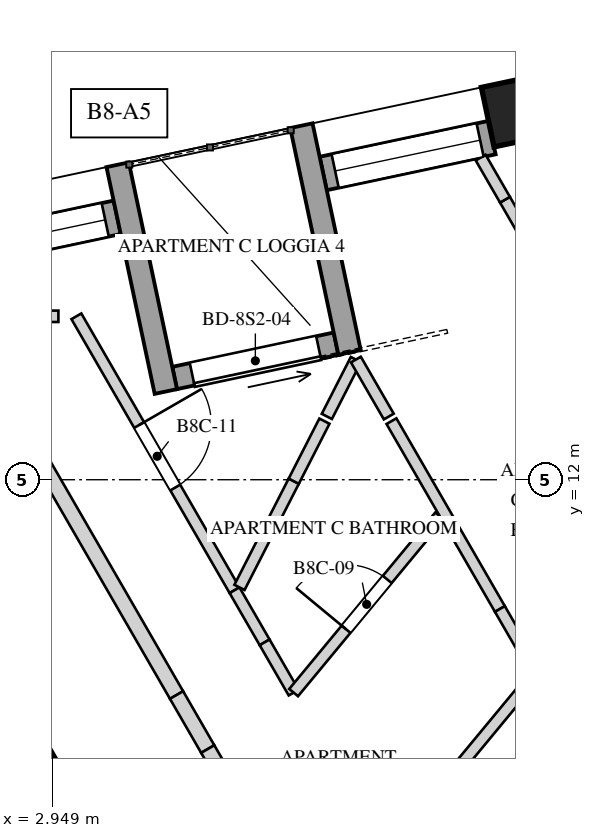
"""IFC4 building model, lengths in metres.
Left out: names, types, materials, properties, quantities, classifications, styles, units other than length and angle.
Written with IfcOpenShell. Run it as: python <this file> out.ifc"""

import sys

from ifc_helpers import new_model, si_unit, direction, frame, frame_2d, origin, origin_2d, place, context, subcontext, project, spatial, rectangle, extrude, element, fill, save


model = new_model("IFC4")
c1 = context("Model", 3, precision=1e-05, world=origin(), true_north=direction((0.0, 1.0)))
c2 = subcontext(c1, "Body", "Model", "MODEL_VIEW")
j1 = project(units=[si_unit("LENGTHUNIT", "METRE"), si_unit("PLANEANGLEUNIT", "RADIAN")], contexts=[c1])
p1 = place(None, origin())
s1 = spatial("IfcSite", under=j1, at=p1, CompositionType="ELEMENT")
p2 = place(p1, origin())
s2 = spatial("IfcBuilding", under=s1, at=p2, CompositionType="ELEMENT")
p3 = place(p2, frame((0.0, 0.0, 344.4)))
s3 = spatial("IfcBuildingStorey", under=s2, at=p3, CompositionType="ELEMENT", Elevation=344.4)
p4 = place(p3, frame((9.93, -4.25, 0.0), z_axis=(0.0, 0.0, 1.0), x_axis=(-0.499994590896, 0.86602852671, 0.0)))
e1 = element("IfcWall", 1, at=p4, inside=s3, PredefinedType="SHEAR", context=c2, shape_type="SweptSolid", body=[
    extrude(rectangle(XDim=17.292, YDim=0.55, at=frame_2d((8.646, 0.0))), origin(), (0.0, 0.0, 1.0), 4.0),
])
p5 = place(p4, frame((6.921, 0.0, 0.0)))
e2 = element("IfcOpeningElement", 2, at=p5, cuts=e1, PredefinedType="OPENING", context=c2, shape_type="SweptSolid", body=[
    extrude(rectangle(XDim=1.0, YDim=2.4, at=frame_2d((0.5, 1.2))), frame((0.0, 0.285, 0.0), z_axis=(0.0, -1.0, 0.0), x_axis=(1.0, 0.0, 0.0)), (0.0, 0.0, 1.0), 0.57),
])
p6 = place(p3, frame((9.163, 16.874, 0.0), z_axis=(0.0, 0.0, 1.0), x_axis=(-0.978147600734, -0.207911690818, 0.0)))
e3 = element("IfcColumn", 3, at=p6, inside=s3, PredefinedType="COLUMN", context=c2, shape_type="SweptSolid", body=[
    extrude(rectangle(XDim=1.0, YDim=0.8, at=origin_2d()), origin(), (0.0, 0.0, 1.0), 4.0),
])
p7 = place(p3, frame((8.731, 16.501, 0.0), z_axis=(0.0, 0.0, 1.0), x_axis=(-0.978153386925, -0.207884467067, 0.0)))
e4 = element("IfcWall", 4, at=p7, inside=s3, PredefinedType="SOLIDWALL", context=c2, shape_type="SweptSolid", body=[
    extrude(rectangle(XDim=2.271, YDim=0.45, at=frame_2d((1.136, 0.0))), origin(), (0.0, 0.0, 1.0), 3.3),
])
p8 = place(p7, frame((0.161, 0.0, 0.4)))
e5 = element("IfcOpeningElement", 5, at=p8, cuts=e4, PredefinedType="OPENING", context=c2, shape_type="SweptSolid", body=[
    extrude(rectangle(XDim=1.95, YDim=2.1, at=frame_2d((0.975, 1.05))), frame((0.0, 0.235, 0.0), z_axis=(0.0, -1.0, 0.0), x_axis=(1.0, 0.0, 0.0)), (0.0, 0.0, 1.0), 0.47),
])
p9 = place(p3, frame((3.799, 15.452, 0.0), z_axis=(0.0, 0.0, 1.0), x_axis=(-0.978153386925, -0.207884467067, 0.0)))
e6 = element("IfcWall", 6, at=p9, inside=s3, PredefinedType="SOLIDWALL", context=c2, shape_type="SweptSolid", body=[
    extrude(rectangle(XDim=2.271, YDim=0.45, at=frame_2d((1.136, 0.0))), origin(), (0.0, 0.0, 1.0), 3.3),
])
p10 = place(p9, frame((0.161, 0.0, 0.4)))
e7 = element("IfcOpeningElement", 7, at=p10, cuts=e6, PredefinedType="OPENING", context=c2, shape_type="SweptSolid", body=[
    extrude(rectangle(XDim=1.95, YDim=2.75, at=frame_2d((0.975, 1.375))), frame((0.0, 0.235, 0.0), z_axis=(0.0, -1.0, 0.0), x_axis=(1.0, 0.0, 0.0)), (0.0, 0.0, 1.0), 0.47),
])
p11 = place(p3, frame((6.678, 13.79, 0.0), z_axis=(0.0, 0.0, 1.0), x_axis=(-0.978153135692, -0.207885649183, 0.0)))
e8 = element("IfcWall", 8, at=p11, inside=s3, PredefinedType="SOLIDWALL", context=c2, shape_type="SweptSolid", body=[
    extrude(rectangle(XDim=2.171, YDim=0.3, at=frame_2d((1.086, 0.0))), origin(), (0.0, 0.0, 1.0), 3.3),
])
p12 = place(p11, frame((0.236, 0.0, 0.0)))
e9 = element("IfcOpeningElement", 9, at=p12, cuts=e8, PredefinedType="OPENING", context=c2, shape_type="SweptSolid", body=[
    extrude(rectangle(XDim=1.7, YDim=2.5, at=frame_2d((0.85, 1.25))), frame((0.0, 0.16, 0.0), z_axis=(0.0, -1.0, 0.0), x_axis=(1.0, 0.0, 0.0)), (0.0, 0.0, 1.0), 0.32),
])
for number, where, z_axis, x_axis in (
    (10, (6.222, 16.658, 0.0), (0.0, 0.0, 1.0), (0.208, -0.978, 0.0)),
    (11, (3.805, 16.144, 0.0), (0.0, 0.0, 1.0), (0.208, -0.978, 0.0)),
):
    element("IfcWall", number, at=place(p3, frame(where, z_axis=z_axis, x_axis=x_axis)), inside=s3, PredefinedType="SOLIDWALL", context=c2, shape_type="SweptSolid", body=[
        extrude(rectangle(XDim=3.05, YDim=0.3, at=frame_2d((1.525, 0.0))), origin(), (0.0, 0.0, 1.0), 3.3),
    ])
p13 = place(p3, frame((1.301, 14.15, 0.0), z_axis=(0.0, 0.0, 1.0), x_axis=(1.0, 0.0, 0.0)))
e12 = element("IfcWall", 12, at=p13, inside=s3, PredefinedType="PARTITIONING", context=c2, shape_type="SweptSolid", body=[
    extrude(rectangle(XDim=1.724, YDim=0.15, at=frame_2d((0.862, 0.0))), origin(), (0.0, 0.0, 1.0), 3.65),
])
p14 = place(p3, frame((3.262, 14.15, 0.0), z_axis=(0.0, 0.0, 1.0), x_axis=(0.500032238466, -0.866006790097, 0.0)))
e13 = element("IfcWall", 13, at=p14, inside=s3, PredefinedType="PARTITIONING", context=c2, shape_type="SweptSolid", body=[
    extrude(rectangle(XDim=4.161, YDim=0.15, at=frame_2d((2.081, 0.0))), origin(), (0.0, 0.0, 1.0), 3.65),
])
p15 = place(p14, frame((1.652, 0.0, 0.0)))
e14 = element("IfcOpeningElement", 14, at=p15, cuts=e13, PredefinedType="OPENING", context=c2, shape_type="SweptSolid", body=[
    extrude(rectangle(XDim=0.95, YDim=2.4, at=frame_2d((0.475, 1.2))), frame((0.0, 0.085, 0.0), z_axis=(0.0, -1.0, 0.0), x_axis=(1.0, 0.0, 0.0)), (0.0, 0.0, 1.0), 0.17),
])
p16 = place(p3, frame((5.343, 10.546, 0.0), z_axis=(0.0, 0.0, 1.0), x_axis=(0.499953838557, -0.866052053466, 0.0)))
e15 = element("IfcWall", 15, at=p16, inside=s3, PredefinedType="PARTITIONING", context=c2, shape_type="SweptSolid", body=[
    extrude(rectangle(XDim=0.792, YDim=0.15, at=frame_2d((0.396, 0.0))), origin(), (0.0, 0.0, 1.0), 2.95),
])
p17 = place(p3, frame((5.739, 9.861, 0.0), z_axis=(0.0, 0.0, 1.0), x_axis=(0.499888569412, -0.866089728707, 0.0)))
e16 = element("IfcWall", 16, at=p17, inside=s3, PredefinedType="PARTITIONING", context=c2, shape_type="SweptSolid", body=[
    extrude(rectangle(XDim=0.763, YDim=0.15, at=frame_2d((0.382, 0.0))), origin(), (0.0, 0.0, 1.0), 3.65),
])
p18 = place(p3, frame((5.408, 10.583, 0.0), z_axis=(0.0, 0.0, 1.0), x_axis=(0.455037050625, 0.890472505223, 0.0)))
e17 = element("IfcWall", 17, at=p18, inside=s3, PredefinedType="PARTITIONING", context=c2, shape_type="SweptSolid", body=[
    extrude(rectangle(XDim=1.569, YDim=0.15, at=frame_2d((0.785, 0.0))), origin(), (0.0, 0.0, 1.0), 2.95),
])
p19 = place(p3, frame((6.122, 11.981, 0.0), z_axis=(0.0, 0.0, 1.0), x_axis=(0.454907271536, 0.890538811228, 0.0)))
e18 = element("IfcWall", 18, at=p19, inside=s3, PredefinedType="PARTITIONING", context=c2, shape_type="SweptSolid", body=[
    extrude(rectangle(XDim=0.887, YDim=0.15, at=frame_2d((0.443, 0.0))), origin(), (0.0, 0.0, 1.0), 3.65),
])
p20 = place(p3, frame((6.12, 9.199, 0.0), z_axis=(0.0, 0.0, 1.0), x_axis=(0.63755942525, 0.770401180733, 0.0)))
e19 = element("IfcWall", 19, at=p20, inside=s3, PredefinedType="PARTITIONING", context=c2, shape_type="SweptSolid", body=[
    extrude(rectangle(XDim=3.014, YDim=0.15, at=frame_2d((1.507, 0.0))), origin(), (0.0, 0.0, 1.0), 3.65),
])
p21 = place(p20, frame((1.082, 0.0, 0.0)))
e20 = element("IfcOpeningElement", 20, at=p21, cuts=e19, PredefinedType="OPENING", context=c2, shape_type="SweptSolid", body=[
    extrude(rectangle(XDim=0.85, YDim=2.4, at=frame_2d((0.425, 1.2))), frame((0.0, 0.085, 0.0), z_axis=(0.0, -1.0, 0.0), x_axis=(1.0, 0.0, 0.0)), (0.0, 0.0, 1.0), 0.17),
])
p22 = place(p3, frame((6.557, 12.833, 0.0), z_axis=(0.0, 0.0, 1.0), x_axis=(0.454870350547, 0.890557670336, 0.0)))
e21 = element("IfcWall", 21, at=p22, inside=s3, PredefinedType="PARTITIONING", context=c2, shape_type="SweptSolid", body=[
    extrude(rectangle(XDim=0.84, YDim=0.15, at=frame_2d((0.42, 0.0))), origin(), (0.0, 0.0, 1.0), 3.65),
])
p23 = place(p3, frame((6.939, 13.581, 0.0), z_axis=(0.0, 0.0, 1.0), x_axis=(0.499990973765, -0.866030615021, 0.0)))
e22 = element("IfcWall", 22, at=p23, inside=s3, PredefinedType="PARTITIONING", context=c2, shape_type="SweptSolid", body=[
    extrude(rectangle(XDim=0.866, YDim=0.15, at=frame_2d((0.433, 0.0))), origin(), (0.0, 0.0, 1.0), 2.95),
])
p24 = place(p3, frame((7.407, 12.771, 0.0), z_axis=(0.0, 0.0, 1.0), x_axis=(0.499966841219, -0.866044547169, 0.0)))
e23 = element("IfcWall", 23, at=p24, inside=s3, PredefinedType="PARTITIONING", context=c2, shape_type="SweptSolid", body=[
    extrude(rectangle(XDim=2.854, YDim=0.15, at=frame_2d((1.427, 0.0))), origin(), (0.0, 0.0, 1.0), 3.65),
])
p25 = place(p3, frame((8.834, 10.299, 0.0), z_axis=(0.0, 0.0, 1.0), x_axis=(0.499945096919, -0.866057099772, 0.0)))
e24 = element("IfcWall", 24, at=p25, inside=s3, PredefinedType="PARTITIONING", context=c2, shape_type="SweptSolid", body=[
    extrude(rectangle(XDim=0.917, YDim=0.15, at=frame_2d((0.459, 0.0))), origin(), (0.0, 0.0, 1.0), 2.55),
])
p26 = place(p3, frame((9.269, 9.396, 0.0), z_axis=(0.0, 0.0, 1.0), x_axis=(-0.637511345934, -0.770440967113, 0.0)))
e25 = element("IfcWall", 25, at=p26, inside=s3, PredefinedType="PARTITIONING", context=c2, shape_type="SweptSolid", body=[
    extrude(rectangle(XDim=3.014, YDim=0.15, at=frame_2d((1.507, 0.0))), origin(), (0.0, 0.0, 1.0), 3.65),
])
p27 = place(p3, frame((10.781, 12.427, 0.0), z_axis=(0.0, 0.0, 1.0), x_axis=(-0.499999645032, 0.866025608725, 0.0)))
e26 = element("IfcWall", 26, at=p27, inside=s3, PredefinedType="PARTITIONING", context=c2, shape_type="SweptSolid", body=[
    extrude(rectangle(XDim=3.761, YDim=0.15, at=frame_2d((1.881, 0.0))), origin(), (0.0, 0.0, 1.0), 3.65),
])
p28 = place(p3, frame((8.901, 15.684, 0.0), z_axis=(0.0, 0.0, 1.0), x_axis=(-0.500118698802, 0.865956862152, 0.0)))
e27 = element("IfcWall", 27, at=p28, inside=s3, PredefinedType="PARTITIONING", context=c2, shape_type="SweptSolid", body=[
    extrude(rectangle(XDim=0.64, YDim=0.15, at=frame_2d((0.32, 0.0))), origin(), (0.0, 0.0, 1.0), 2.95),
])
p29 = place(p3, frame((2.483, 12.8, 0.0), z_axis=(0.0, 0.0, 1.0), x_axis=(0.499982771656, -0.866035350345, 0.0)))
e28 = element("IfcWall", 28, at=p29, inside=s3, PredefinedType="SOLIDWALL", context=c2, shape_type="SweptSolid", body=[
    extrude(rectangle(XDim=4.195, YDim=0.2, at=frame_2d((2.097, 0.0))), origin(), (0.0, 0.0, 1.0), 3.65),
])
p30 = place(p3, frame((4.58, 9.167, 0.0), z_axis=(0.0, 0.0, 1.0), x_axis=(0.499945576647, -0.866056822842, 0.0)))
e29 = element("IfcWall", 29, at=p30, inside=s3, PredefinedType="SOLIDWALL", context=c2, shape_type="SweptSolid", body=[
    extrude(rectangle(XDim=0.821, YDim=0.2, at=frame_2d((0.41, 0.0))), origin(), (0.0, 0.0, 1.0), 2.95),
])
p31 = place(p3, frame((4.99, 8.457, 0.0), z_axis=(0.0, 0.0, 1.0), x_axis=(0.500064554934, -0.865988129768, 0.0)))
e30 = element("IfcWall", 30, at=p31, inside=s3, PredefinedType="SOLIDWALL", context=c2, shape_type="SweptSolid", body=[
    extrude(rectangle(XDim=1.05, YDim=0.2, at=frame_2d((0.525, 0.0))), origin(), (0.0, 0.0, 1.0), 3.65),
])
p32 = place(p8, origin())
e31 = element("IfcWindow", 31, at=p32, inside=s3, PartitioningType="SINGLE_PANEL", PredefinedType="WINDOW", context=c2, shape_type="SweptSolid", body=[
    extrude(rectangle(XDim=1.95, YDim=2.1, at=frame_2d((0.975, 1.05))), frame((0.0, 0.03, 0.0), z_axis=(0.0, -1.0, 0.0), x_axis=(1.0, 0.0, 0.0)), (0.0, 0.0, 1.0), 0.06),
])
fill(e5, e31)
p33 = place(p10, origin())
e32 = element("IfcWindow", 32, at=p33, inside=s3, PartitioningType="SINGLE_PANEL", PredefinedType="WINDOW", context=c2, shape_type="SweptSolid", body=[
    extrude(rectangle(XDim=1.95, YDim=2.75, at=frame_2d((0.975, 1.375))), frame((0.0, 0.03, 0.0), z_axis=(0.0, -1.0, 0.0), x_axis=(1.0, 0.0, 0.0)), (0.0, 0.0, 1.0), 0.06),
])
fill(e7, e32)
p34 = place(p12, origin())
e33 = element("IfcDoor", 33, at=p34, inside=s3, OperationType="SLIDING_TO_LEFT", PredefinedType="DOOR", context=c2, shape_type="SweptSolid", body=[
    extrude(rectangle(XDim=1.7, YDim=2.5, at=frame_2d((0.85, 1.25))), frame((0.0, 0.025, 0.0), z_axis=(0.0, -1.0, 0.0), x_axis=(1.0, 0.0, 0.0)), (0.0, 0.0, 1.0), 0.05),
])
fill(e9, e33)
p35 = place(p21, origin())
e34 = element("IfcDoor", 34, at=p35, inside=s3, OperationType="SINGLE_SWING_LEFT", PredefinedType="DOOR", context=c2, shape_type="SweptSolid", body=[
    extrude(rectangle(XDim=0.85, YDim=2.4, at=frame_2d((0.425, 1.2))), frame((0.0, 0.025, 0.0), z_axis=(0.0, -1.0, 0.0), x_axis=(1.0, 0.0, 0.0)), (0.0, 0.0, 1.0), 0.05),
])
fill(e20, e34)
p36 = place(p15, origin())
e35 = element("IfcDoor", 35, at=p36, inside=s3, OperationType="SINGLE_SWING_LEFT", PredefinedType="DOOR", context=c2, shape_type="SweptSolid", body=[
    extrude(rectangle(XDim=0.95, YDim=2.4, at=frame_2d((0.475, 1.2))), frame((0.0, 0.025, 0.0), z_axis=(0.0, -1.0, 0.0), x_axis=(1.0, 0.0, 0.0)), (0.0, 0.0, 1.0), 0.05),
])
fill(e14, e35)
save(model, sys.argv[1])
